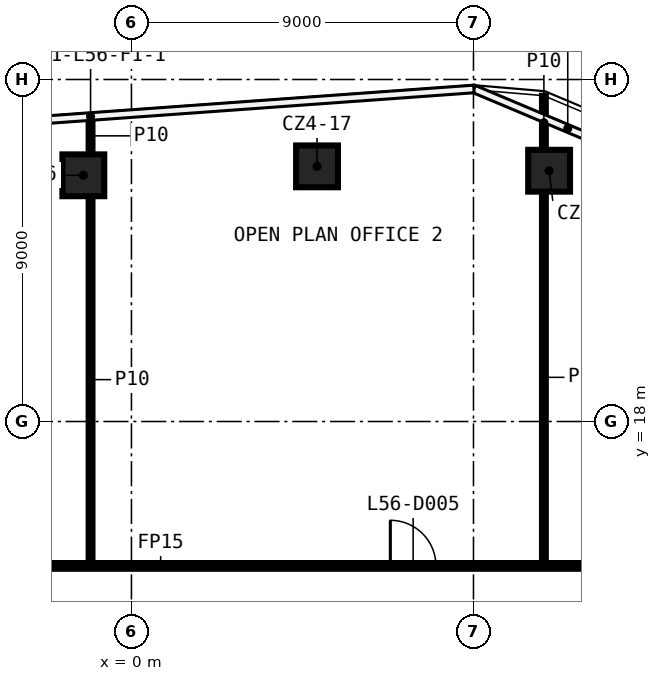
"""IFC4 building model, lengths in metres.
Left out: names, types, materials, properties, quantities, classifications, styles, units other than length and angle.
Written with IfcOpenShell. Run it as: python <this file> out.ifc"""

import sys

from ifc_helpers import new_model, si_unit, direction, frame, frame_2d, origin, origin_2d, place, context, subcontext, project, spatial, rectangle, extrude, element, fill, save


model = new_model("IFC4")
c1 = context("Model", 3, precision=1e-05, world=origin(), true_north=direction((0.0, 1.0)))
c2 = subcontext(c1, "Body", "Model", "MODEL_VIEW")
j1 = project(units=[si_unit("LENGTHUNIT", "METRE"), si_unit("PLANEANGLEUNIT", "RADIAN")], contexts=[c1])
p1 = place(None, origin())
s1 = spatial("IfcSite", under=j1, at=p1, CompositionType="ELEMENT")
p2 = place(p1, origin())
s2 = spatial("IfcBuilding", under=s1, at=p2, CompositionType="ELEMENT")
p3 = place(p2, frame((0.0, 0.0, 266.4)))
s3 = spatial("IfcBuildingStorey", under=s2, at=p3, CompositionType="ELEMENT", Elevation=266.4)
for number, where, z_axis, x_axis in (
    (1, (-1.266, 24.479, 0.0), (0.0, 0.0, 1.0), (1.0, 0.0, 0.0)),
    (2, (4.883, 24.714, 0.0), (0.0, 0.0, 1.0), (1.0, 0.0, 0.0)),
    (3, (10.99, 24.599, 0.0), (0.0, 0.0, 1.0), (1.0, 0.0, 0.0)),
):
    element("IfcColumn", number, at=place(p3, frame(where, z_axis=z_axis, x_axis=x_axis)), inside=s3, PredefinedType="COLUMN", context=c2, shape_type="SweptSolid", body=[
        extrude(rectangle(XDim=1.1, YDim=1.1, at=origin_2d()), origin(), (0.0, 0.0, 1.0), 3.82),
    ])
p4 = place(p3, frame((-5.075, 14.2, 0.0), z_axis=(0.0, 0.0, 1.0), x_axis=(1.0, 0.0, 0.0)))
e4 = element("IfcWall", 4, at=p4, inside=s3, PredefinedType="PARTITIONING", context=c2, shape_type="SweptSolid", body=[
    extrude(rectangle(XDim=22.35, YDim=0.15, at=frame_2d((11.175, 0.0))), origin(), (0.0, 0.0, 1.0), 3.82),
])
p5 = place(p4, frame((18.193, 0.0, 0.0)))
e5 = element("IfcOpeningElement", 5, at=p5, cuts=e4, PredefinedType="OPENING", context=c2, shape_type="SweptSolid", body=[
    extrude(rectangle(XDim=1.2, YDim=2.1, at=frame_2d((0.6, 1.05))), frame((0.0, 0.085, 0.0), z_axis=(0.0, -1.0, 0.0), x_axis=(1.0, 0.0, 0.0)), (0.0, 0.0, 1.0), 0.17),
])
p6 = place(p4, frame((11.887, 0.0, 0.0)))
e6 = element("IfcOpeningElement", 6, at=p6, cuts=e4, PredefinedType="OPENING", context=c2, shape_type="SweptSolid", body=[
    extrude(rectangle(XDim=1.2, YDim=2.1, at=frame_2d((0.6, 1.05))), frame((0.0, 0.085, 0.0), z_axis=(0.0, -1.0, 0.0), x_axis=(1.0, 0.0, 0.0)), (0.0, 0.0, 1.0), 0.17),
])
p7 = place(p3, frame((10.853, 14.275, 0.0), z_axis=(0.0, 0.0, 1.0), x_axis=(0.0, 1.0, 0.0)))
e7 = element("IfcWall", 7, at=p7, inside=s3, PredefinedType="PARTITIONING", context=c2, shape_type="SweptSolid", body=[
    extrude(rectangle(XDim=9.774, YDim=0.1, at=frame_2d((4.887, 0.0))), origin(), (0.0, 0.0, 1.0), 3.82),
])
p8 = place(p3, frame((10.853, 25.149, 0.0), z_axis=(0.0, 0.0, 1.0), x_axis=(0.0, 1.0, 0.0)))
e8 = element("IfcWall", 8, at=p8, inside=s3, PredefinedType="PARTITIONING", context=c2, shape_type="SweptSolid", body=[
    extrude(rectangle(XDim=1.423, YDim=0.1, at=frame_2d((0.712, 0.0))), origin(), (0.0, 0.0, 1.0), 3.82),
])
p9 = place(p3, frame((-1.076, 14.275, 0.0), z_axis=(0.0, 0.0, 1.0), x_axis=(0.0, 1.0, 0.0)))
e9 = element("IfcWall", 9, at=p9, inside=s3, PredefinedType="PARTITIONING", context=c2, shape_type="SweptSolid", body=[
    extrude(rectangle(XDim=9.654, YDim=0.1, at=frame_2d((4.827, 0.0))), origin(), (0.0, 0.0, 1.0), 3.82),
])
p10 = place(p3, frame((-1.076, 25.029, 0.0), z_axis=(0.0, 0.0, 1.0), x_axis=(0.0, 1.0, 0.0)))
e10 = element("IfcWall", 10, at=p10, inside=s3, PredefinedType="PARTITIONING", context=c2, shape_type="SweptSolid", body=[
    extrude(rectangle(XDim=0.976, YDim=0.1, at=frame_2d((0.488, 0.0))), origin(), (0.0, 0.0, 1.0), 3.82),
])
p11 = place(p6, origin())
e11 = element("IfcDoor", 11, at=p11, inside=s3, OperationType="SINGLE_SWING_RIGHT", PredefinedType="DOOR", context=c2, shape_type="SweptSolid", body=[
    extrude(rectangle(XDim=1.2, YDim=2.1, at=frame_2d((0.6, 1.05))), frame((0.0, 0.025, 0.0), z_axis=(0.0, -1.0, 0.0), x_axis=(1.0, 0.0, 0.0)), (0.0, 0.0, 1.0), 0.05),
])
fill(e6, e11)
save(model, sys.argv[1])
